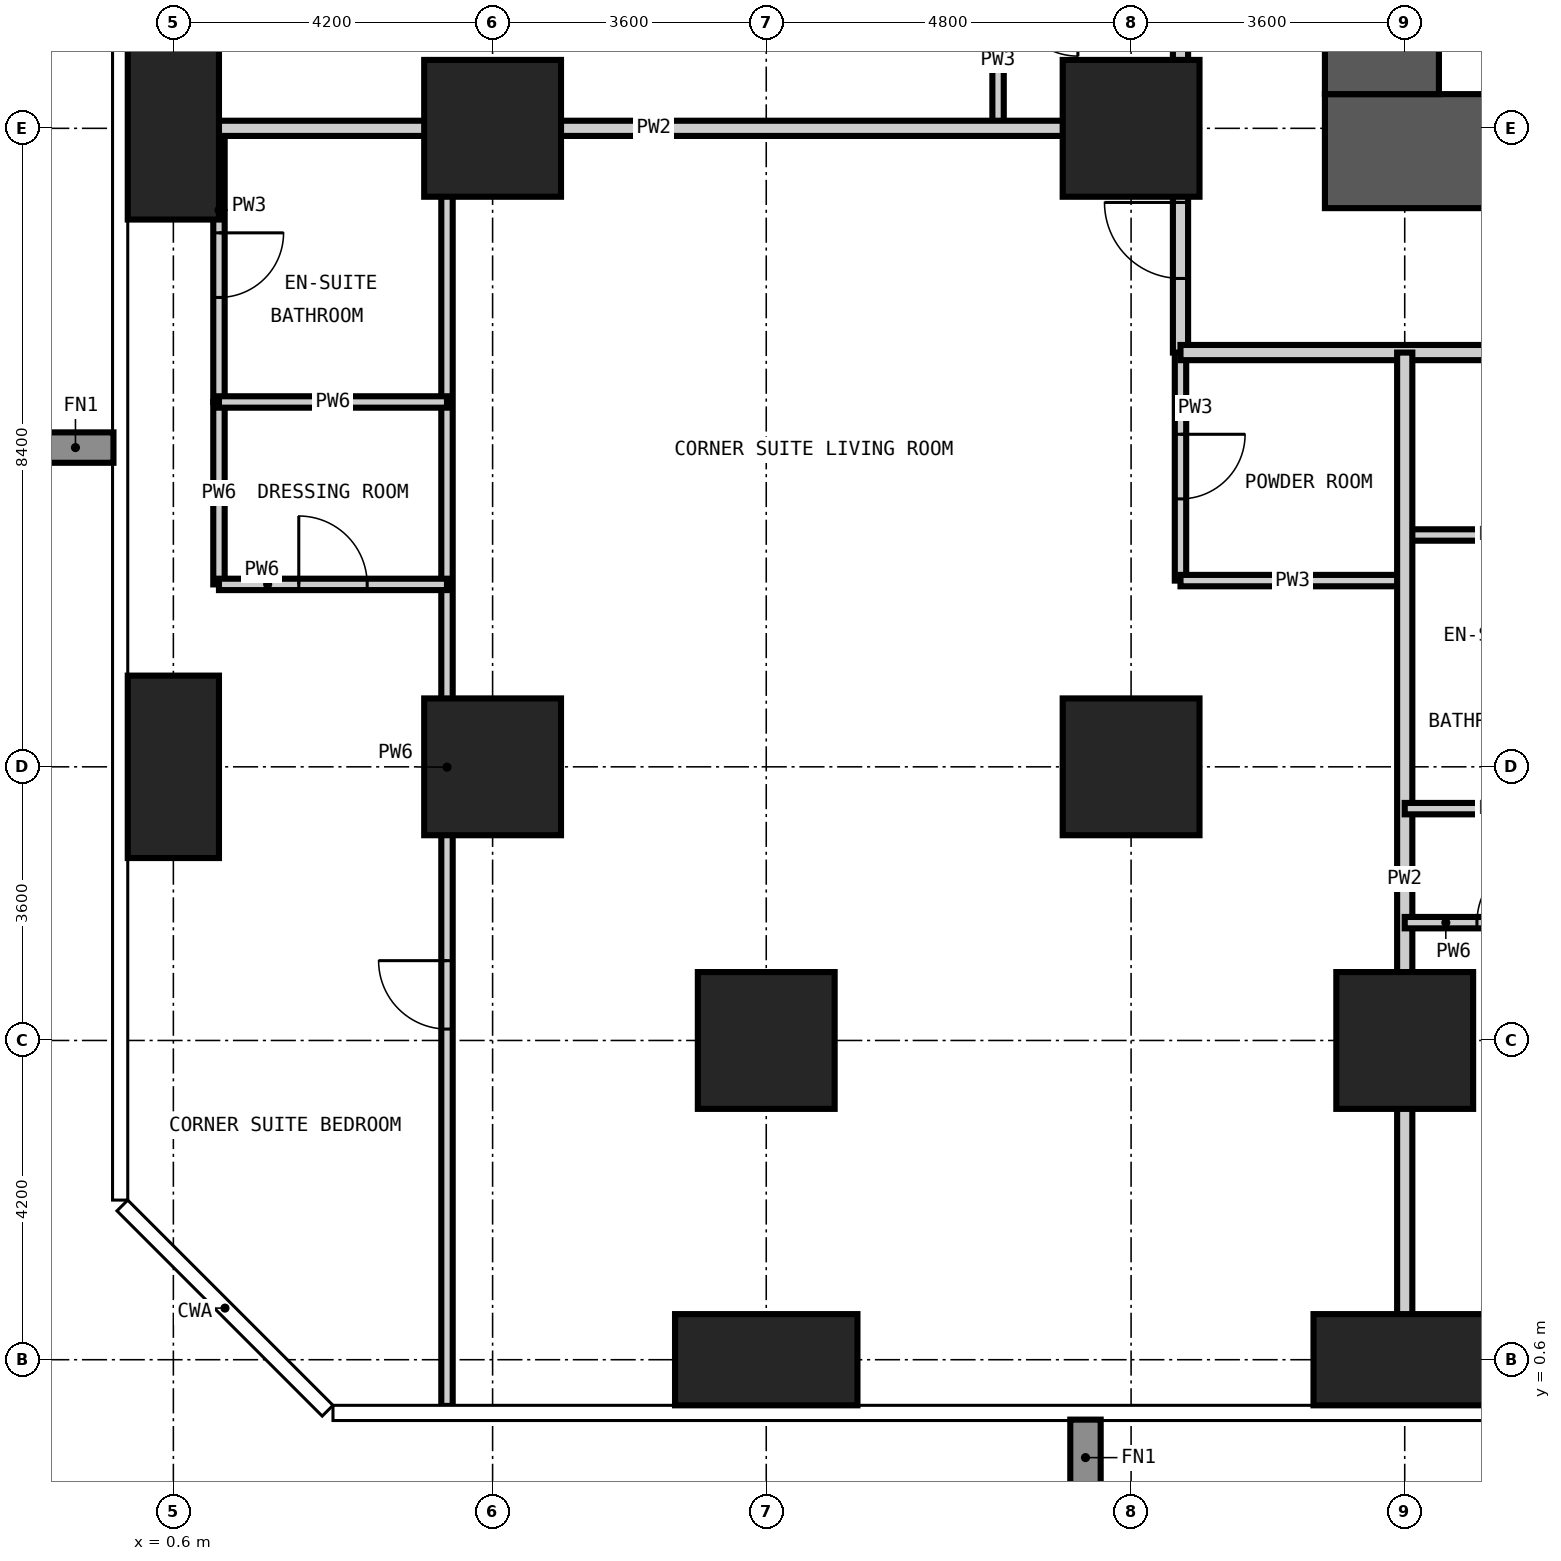
"""IFC4 building model, lengths in metres.
Left out: names, types, materials, properties, quantities, classifications, styles, units other than length and angle.
Written with IfcOpenShell. Run it as: python <this file> out.ifc"""

import sys

from ifc_helpers import new_model, si_unit, direction, frame, frame_2d, origin, origin_2d, place, context, subcontext, project, spatial, rectangle, extrude, element, fill, save


model = new_model("IFC4")
c1 = context("Model", 3, precision=1e-05, world=origin(), true_north=direction((0.0, 1.0)))
c2 = subcontext(c1, "Body", "Model", "MODEL_VIEW")
j1 = project(units=[si_unit("LENGTHUNIT", "METRE"), si_unit("PLANEANGLEUNIT", "RADIAN")], contexts=[c1])
p1 = place(None, origin())
s1 = spatial("IfcSite", under=j1, at=p1, CompositionType="ELEMENT")
p2 = place(p1, origin())
s2 = spatial("IfcBuilding", under=s1, at=p2, CompositionType="ELEMENT")
p3 = place(p2, frame((0.0, 0.0, 55.8)))
s3 = spatial("IfcBuildingStorey", under=s2, at=p3, CompositionType="ELEMENT", Elevation=55.8)
for number, where, z_axis, x_axis in (
    (1, (0.6, 8.4, -0.35), (0.0, 0.0, 1.0), (1.0, 0.0, 0.0)),
    (2, (0.6, 16.8, -0.35), (0.0, 0.0, 1.0), (1.0, 0.0, 0.0)),
):
    element("IfcColumn", number, at=place(p3, frame(where, z_axis=z_axis, x_axis=x_axis)), inside=s3, PredefinedType="COLUMN", context=c2, shape_type="SweptSolid", body=[
        extrude(rectangle(XDim=1.2, YDim=2.4, at=origin_2d()), origin(), (0.0, 0.0, 1.0), 3.6),
    ])
for number, where, z_axis, x_axis in (
    (3, (4.8, 8.4, -0.35), (0.0, 0.0, 1.0), (1.0, 0.0, 0.0)),
    (4, (4.8, 16.8, -0.35), (0.0, 0.0, 1.0), (1.0, 0.0, 0.0)),
):
    element("IfcColumn", number, at=place(p3, frame(where, z_axis=z_axis, x_axis=x_axis)), inside=s3, PredefinedType="COLUMN", context=c2, shape_type="SweptSolid", body=[
        extrude(rectangle(XDim=1.8, YDim=1.8, at=origin_2d()), origin(), (0.0, 0.0, 1.0), 3.6),
    ])
p4 = place(p3, frame((8.4, 0.6, -0.35), z_axis=(0.0, 0.0, 1.0), x_axis=(1.0, 0.0, 0.0)))
e5 = element("IfcColumn", 5, at=p4, inside=s3, PredefinedType="COLUMN", context=c2, shape_type="SweptSolid", body=[
    extrude(rectangle(XDim=2.4, YDim=1.2, at=origin_2d()), origin(), (0.0, 0.0, 1.0), 3.6),
])
for number, where, z_axis, x_axis in (
    (6, (8.4, 4.8, -0.35), (0.0, 0.0, 1.0), (1.0, 0.0, 0.0)),
    (7, (13.2, 8.4, -0.35), (0.0, 0.0, 1.0), (1.0, 0.0, 0.0)),
    (8, (13.2, 16.8, -0.35), (0.0, 0.0, 1.0), (1.0, 0.0, 0.0)),
):
    element("IfcColumn", number, at=place(p3, frame(where, z_axis=z_axis, x_axis=x_axis)), inside=s3, PredefinedType="COLUMN", context=c2, shape_type="SweptSolid", body=[
        extrude(rectangle(XDim=1.8, YDim=1.8, at=origin_2d()), origin(), (0.0, 0.0, 1.0), 3.6),
    ])
p5 = place(p3, frame((16.8, 0.6, -0.35), z_axis=(0.0, 0.0, 1.0), x_axis=(1.0, 0.0, 0.0)))
e9 = element("IfcColumn", 9, at=p5, inside=s3, PredefinedType="COLUMN", context=c2, shape_type="SweptSolid", body=[
    extrude(rectangle(XDim=2.4, YDim=1.2, at=origin_2d()), origin(), (0.0, 0.0, 1.0), 3.6),
])
p6 = place(p3, frame((16.8, 4.8, -0.35), z_axis=(0.0, 0.0, 1.0), x_axis=(1.0, 0.0, 0.0)))
e10 = element("IfcColumn", 10, at=p6, inside=s3, PredefinedType="COLUMN", context=c2, shape_type="SweptSolid", body=[
    extrude(rectangle(XDim=1.8, YDim=1.8, at=origin_2d()), origin(), (0.0, 0.0, 1.0), 3.6),
])
p7 = place(p3, frame((15.75, 16.5, -0.35), z_axis=(0.0, 0.0, 1.0), x_axis=(1.0, 0.0, 0.0)))
e11 = element("IfcWall", 11, at=p7, inside=s3, PredefinedType="SHEAR", context=c2, shape_type="SweptSolid", body=[
    extrude(rectangle(XDim=27.3, YDim=1.5, at=frame_2d((13.65, 0.0))), origin(), (0.0, 0.0, 1.0), 3.6),
])
p8 = place(p7, frame((13.15, 0.0, 0.35)))
e12 = element("IfcOpeningElement", 12, at=p8, cuts=e11, PredefinedType="OPENING", context=c2, shape_type="SweptSolid", body=[
    extrude(rectangle(XDim=1.0, YDim=2.1, at=frame_2d((0.5, 1.05))), frame((0.0, 0.76, 0.0), z_axis=(0.0, -1.0, 0.0), x_axis=(1.0, 0.0, 0.0)), (0.0, 0.0, 1.0), 1.52),
])
p9 = place(p7, frame((19.45, 0.0, 0.35)))
e13 = element("IfcOpeningElement", 13, at=p9, cuts=e11, PredefinedType="OPENING", context=c2, shape_type="SweptSolid", body=[
    extrude(rectangle(XDim=1.0, YDim=2.1, at=frame_2d((0.5, 1.05))), frame((0.0, 0.76, 0.0), z_axis=(0.0, -1.0, 0.0), x_axis=(1.0, 0.0, 0.0)), (0.0, 0.0, 1.0), 1.52),
])
p10 = place(p3, frame((16.5, 41.55, -0.35), z_axis=(0.0, 0.0, 1.0), x_axis=(0.0, -1.0, 0.0)))
e14 = element("IfcWall", 14, at=p10, inside=s3, PredefinedType="SHEAR", context=c2, shape_type="SweptSolid", body=[
    extrude(rectangle(XDim=24.3, YDim=1.5, at=frame_2d((12.15, 0.0))), origin(), (0.0, 0.0, 1.0), 3.6),
])
p11 = place(p10, frame((11.25, 0.0, 0.35)))
e15 = element("IfcOpeningElement", 15, at=p11, cuts=e14, PredefinedType="OPENING", context=c2, shape_type="SweptSolid", body=[
    extrude(rectangle(XDim=1.8, YDim=2.2, at=frame_2d((0.9, 1.1))), frame((0.0, 0.76, 0.0), z_axis=(0.0, -1.0, 0.0), x_axis=(1.0, 0.0, 0.0)), (0.0, 0.0, 1.0), 1.52),
])
p12 = place(p10, frame((20.05, 0.0, 0.35)))
e16 = element("IfcOpeningElement", 16, at=p12, cuts=e14, PredefinedType="OPENING", context=c2, shape_type="SweptSolid", body=[
    extrude(rectangle(XDim=1.0, YDim=2.1, at=frame_2d((0.5, 1.05))), frame((0.0, 0.76, 0.0), z_axis=(0.0, -1.0, 0.0), x_axis=(1.0, 0.0, 0.0)), (0.0, 0.0, 1.0), 1.52),
])
p13 = place(p10, frame((5.35, 0.0, 0.35)))
e17 = element("IfcOpeningElement", 17, at=p13, cuts=e14, PredefinedType="OPENING", context=c2, shape_type="SweptSolid", body=[
    extrude(rectangle(XDim=1.0, YDim=2.1, at=frame_2d((0.5, 1.05))), frame((0.0, 0.76, 0.0), z_axis=(0.0, -1.0, 0.0), x_axis=(1.0, 0.0, 0.0)), (0.0, 0.0, 1.0), 1.52),
])
p14 = place(p3, frame((1.2, 13.2, 0.0), z_axis=(0.0, 0.0, 1.0), x_axis=(0.0, 1.0, 0.0)))
e18 = element("IfcWall", 18, at=p14, inside=s3, PredefinedType="PARTITIONING", context=c2, shape_type="SweptSolid", body=[
    extrude(rectangle(XDim=3.6, YDim=0.15, at=frame_2d((1.8, 0.0))), origin(), (0.0, 0.0, 1.0), 3.25),
])
p15 = place(p14, frame((1.375, 0.0, 0.0)))
e19 = element("IfcOpeningElement", 19, at=p15, cuts=e18, PredefinedType="OPENING", context=c2, shape_type="SweptSolid", body=[
    extrude(rectangle(XDim=0.85, YDim=2.1, at=frame_2d((0.425, 1.05))), frame((0.0, 0.085, 0.0), z_axis=(0.0, -1.0, 0.0), x_axis=(1.0, 0.0, 0.0)), (0.0, 0.0, 1.0), 0.17),
])
p16 = place(p3, frame((11.45, 16.8, 0.0), z_axis=(0.0, 0.0, 1.0), x_axis=(0.0, 1.0, 0.0)))
e20 = element("IfcWall", 20, at=p16, inside=s3, PredefinedType="PARTITIONING", context=c2, shape_type="SweptSolid", body=[
    extrude(rectangle(XDim=1.8, YDim=0.15, at=frame_2d((0.9, 0.0))), origin(), (0.0, 0.0, 1.0), 3.25),
])
p17 = place(p3, frame((13.85, 10.85, 0.0), z_axis=(0.0, 0.0, 1.0), x_axis=(0.0, 1.0, 0.0)))
e21 = element("IfcWall", 21, at=p17, inside=s3, PredefinedType="PARTITIONING", context=c2, shape_type="SweptSolid", body=[
    extrude(rectangle(XDim=3.0, YDim=0.15, at=frame_2d((1.5, 0.0))), origin(), (0.0, 0.0, 1.0), 3.25),
])
p18 = place(p17, frame((1.075, 0.0, 0.0)))
e22 = element("IfcOpeningElement", 22, at=p18, cuts=e21, PredefinedType="OPENING", context=c2, shape_type="SweptSolid", body=[
    extrude(rectangle(XDim=0.85, YDim=2.1, at=frame_2d((0.425, 1.05))), frame((0.0, 0.085, 0.0), z_axis=(0.0, -1.0, 0.0), x_axis=(1.0, 0.0, 0.0)), (0.0, 0.0, 1.0), 0.17),
])
p19 = place(p3, frame((13.85, 10.85, 0.0), z_axis=(0.0, 0.0, 1.0), x_axis=(1.0, 0.0, 0.0)))
e23 = element("IfcWall", 23, at=p19, inside=s3, PredefinedType="PARTITIONING", context=c2, shape_type="SweptSolid", body=[
    extrude(rectangle(XDim=2.95, YDim=0.15, at=frame_2d((1.475, 0.0))), origin(), (0.0, 0.0, 1.0), 3.25),
])
p20 = place(p3, frame((16.8, 11.45, 0.0), z_axis=(0.0, 0.0, 1.0), x_axis=(1.0, 0.0, 0.0)))
e24 = element("IfcWall", 24, at=p20, inside=s3, PredefinedType="PARTITIONING", context=c2, shape_type="SweptSolid", body=[
    extrude(rectangle(XDim=2.4, YDim=0.15, at=frame_2d((1.2, 0.0))), origin(), (0.0, 0.0, 1.0), 3.25),
])
p21 = place(p3, frame((13.85, 13.85, 0.0), z_axis=(0.0, 0.0, 1.0), x_axis=(0.0, 1.0, 0.0)))
e25 = element("IfcWall", 25, at=p21, inside=s3, PredefinedType="PARTITIONING", context=c2, shape_type="SweptSolid", body=[
    extrude(rectangle(XDim=32.3, YDim=0.2, at=frame_2d((16.15, 0.0))), origin(), (0.0, 0.0, 1.0), 3.25),
])
p22 = place(p21, frame((5.45, 0.0, 0.0)))
e26 = element("IfcOpeningElement", 26, at=p22, cuts=e25, PredefinedType="OPENING", context=c2, shape_type="SweptSolid", body=[
    extrude(rectangle(XDim=1.0, YDim=2.2, at=frame_2d((0.5, 1.1))), frame((0.0, 0.11, 0.0), z_axis=(0.0, -1.0, 0.0), x_axis=(1.0, 0.0, 0.0)), (0.0, 0.0, 1.0), 0.22),
])
p23 = place(p21, frame((13.85, 0.0, 0.0)))
e27 = element("IfcOpeningElement", 27, at=p23, cuts=e25, PredefinedType="OPENING", context=c2, shape_type="SweptSolid", body=[
    extrude(rectangle(XDim=1.0, YDim=2.2, at=frame_2d((0.5, 1.1))), frame((0.0, 0.11, 0.0), z_axis=(0.0, -1.0, 0.0), x_axis=(1.0, 0.0, 0.0)), (0.0, 0.0, 1.0), 0.22),
])
p24 = place(p21, frame((22.25, 0.0, 0.0)))
e28 = element("IfcOpeningElement", 28, at=p24, cuts=e25, PredefinedType="OPENING", context=c2, shape_type="SweptSolid", body=[
    extrude(rectangle(XDim=1.0, YDim=2.2, at=frame_2d((0.5, 1.1))), frame((0.0, 0.11, 0.0), z_axis=(0.0, -1.0, 0.0), x_axis=(1.0, 0.0, 0.0)), (0.0, 0.0, 1.0), 0.22),
])
p25 = place(p21, frame((0.975, 0.0, 0.0)))
e29 = element("IfcOpeningElement", 29, at=p25, cuts=e25, PredefinedType="OPENING", context=c2, shape_type="SweptSolid", body=[
    extrude(rectangle(XDim=1.0, YDim=2.2, at=frame_2d((0.5, 1.1))), frame((0.0, 0.11, 0.0), z_axis=(0.0, -1.0, 0.0), x_axis=(1.0, 0.0, 0.0)), (0.0, 0.0, 1.0), 0.22),
])
p26 = place(p21, frame((29.725, 0.0, 0.0)))
e30 = element("IfcOpeningElement", 30, at=p26, cuts=e25, PredefinedType="OPENING", context=c2, shape_type="SweptSolid", body=[
    extrude(rectangle(XDim=1.0, YDim=2.2, at=frame_2d((0.5, 1.1))), frame((0.0, 0.11, 0.0), z_axis=(0.0, -1.0, 0.0), x_axis=(1.0, 0.0, 0.0)), (0.0, 0.0, 1.0), 0.22),
])
p27 = place(p3, frame((45.55, 13.85, 0.0), z_axis=(0.0, 0.0, 1.0), x_axis=(-1.0, 0.0, 0.0)))
e31 = element("IfcWall", 31, at=p27, inside=s3, PredefinedType="PARTITIONING", context=c2, shape_type="SweptSolid", body=[
    extrude(rectangle(XDim=31.7, YDim=0.2, at=frame_2d((15.85, 0.0))), origin(), (0.0, 0.0, 1.0), 3.25),
])
p28 = place(p27, frame((24.05, 0.0, 0.0)))
e32 = element("IfcOpeningElement", 32, at=p28, cuts=e31, PredefinedType="OPENING", context=c2, shape_type="SweptSolid", body=[
    extrude(rectangle(XDim=1.0, YDim=2.2, at=frame_2d((0.5, 1.1))), frame((0.0, 0.11, 0.0), z_axis=(0.0, -1.0, 0.0), x_axis=(1.0, 0.0, 0.0)), (0.0, 0.0, 1.0), 0.22),
])
p29 = place(p27, frame((15.65, 0.0, 0.0)))
e33 = element("IfcOpeningElement", 33, at=p29, cuts=e31, PredefinedType="OPENING", context=c2, shape_type="SweptSolid", body=[
    extrude(rectangle(XDim=1.0, YDim=2.2, at=frame_2d((0.5, 1.1))), frame((0.0, 0.11, 0.0), z_axis=(0.0, -1.0, 0.0), x_axis=(1.0, 0.0, 0.0)), (0.0, 0.0, 1.0), 0.22),
])
p30 = place(p27, frame((7.25, 0.0, 0.0)))
e34 = element("IfcOpeningElement", 34, at=p30, cuts=e31, PredefinedType="OPENING", context=c2, shape_type="SweptSolid", body=[
    extrude(rectangle(XDim=1.0, YDim=2.2, at=frame_2d((0.5, 1.1))), frame((0.0, 0.11, 0.0), z_axis=(0.0, -1.0, 0.0), x_axis=(1.0, 0.0, 0.0)), (0.0, 0.0, 1.0), 0.22),
])
for number, where, z_axis, x_axis in (
    (35, (16.8, -0.008, 0.0), (0.0, 0.0, 1.0), (0.0, 1.0, 0.0)),
    (36, (-0.008, 16.8, 0.0), (0.0, 0.0, 1.0), (1.0, 0.0, 0.0)),
):
    element("IfcWall", number, at=place(p3, frame(where, z_axis=z_axis, x_axis=x_axis)), inside=s3, PredefinedType="PARTITIONING", context=c2, shape_type="SweptSolid", body=[
        extrude(rectangle(XDim=13.858, YDim=0.2, at=frame_2d((6.929, 0.0))), origin(), (0.0, 0.0, 1.0), 3.25),
    ])
p31 = place(p3, frame((1.2, 10.8, 0.0), z_axis=(0.0, 0.0, 1.0), x_axis=(0.0, 1.0, 0.0)))
e37 = element("IfcWall", 37, at=p31, inside=s3, PredefinedType="PARTITIONING", context=c2, shape_type="SweptSolid", body=[
    extrude(rectangle(XDim=2.4, YDim=0.15, at=frame_2d((1.2, 0.0))), origin(), (0.0, 0.0, 1.0), 3.25),
])
p32 = place(p3, frame((4.2, -0.008, 0.0), z_axis=(0.0, 0.0, 1.0), x_axis=(0.0, 1.0, 0.0)))
e38 = element("IfcWall", 38, at=p32, inside=s3, PredefinedType="PARTITIONING", context=c2, shape_type="SweptSolid", body=[
    extrude(rectangle(XDim=16.808, YDim=0.15, at=frame_2d((8.404, 0.0))), origin(), (0.0, 0.0, 1.0), 3.25),
])
p33 = place(p32, frame((4.958, 0.0, 0.0)))
e39 = element("IfcOpeningElement", 39, at=p33, cuts=e38, PredefinedType="OPENING", context=c2, shape_type="SweptSolid", body=[
    extrude(rectangle(XDim=0.9, YDim=2.1, at=frame_2d((0.45, 1.05))), frame((0.0, 0.085, 0.0), z_axis=(0.0, -1.0, 0.0), x_axis=(1.0, 0.0, 0.0)), (0.0, 0.0, 1.0), 0.17),
])
p34 = place(p3, frame((16.8, 6.35, 0.0), z_axis=(0.0, 0.0, 1.0), x_axis=(1.0, 0.0, 0.0)))
e40 = element("IfcWall", 40, at=p34, inside=s3, PredefinedType="PARTITIONING", context=c2, shape_type="SweptSolid", body=[
    extrude(rectangle(XDim=2.4, YDim=0.15, at=frame_2d((1.2, 0.0))), origin(), (0.0, 0.0, 1.0), 3.25),
])
p35 = place(p34, frame((0.95, 0.0, 0.0)))
e41 = element("IfcOpeningElement", 41, at=p35, cuts=e40, PredefinedType="OPENING", context=c2, shape_type="SweptSolid", body=[
    extrude(rectangle(XDim=0.9, YDim=2.1, at=frame_2d((0.45, 1.05))), frame((0.0, 0.085, 0.0), z_axis=(0.0, -1.0, 0.0), x_axis=(1.0, 0.0, 0.0)), (0.0, 0.0, 1.0), 0.17),
])
p36 = place(p3, frame((16.8, 7.85, 0.0), z_axis=(0.0, 0.0, 1.0), x_axis=(1.0, 0.0, 0.0)))
e42 = element("IfcWall", 42, at=p36, inside=s3, PredefinedType="PARTITIONING", context=c2, shape_type="SweptSolid", body=[
    extrude(rectangle(XDim=2.4, YDim=0.15, at=frame_2d((1.2, 0.0))), origin(), (0.0, 0.0, 1.0), 3.25),
])
p37 = place(p3, frame((1.2, 10.8, 0.0), z_axis=(0.0, 0.0, 1.0), x_axis=(1.0, 0.0, 0.0)))
e43 = element("IfcWall", 43, at=p37, inside=s3, PredefinedType="PARTITIONING", context=c2, shape_type="SweptSolid", body=[
    extrude(rectangle(XDim=3.0, YDim=0.15, at=frame_2d((1.5, 0.0))), origin(), (0.0, 0.0, 1.0), 3.25),
])
p38 = place(p37, frame((1.05, 0.0, 0.0)))
e44 = element("IfcOpeningElement", 44, at=p38, cuts=e43, PredefinedType="OPENING", context=c2, shape_type="SweptSolid", body=[
    extrude(rectangle(XDim=0.9, YDim=2.1, at=frame_2d((0.45, 1.05))), frame((0.0, 0.085, 0.0), z_axis=(0.0, -1.0, 0.0), x_axis=(1.0, 0.0, 0.0)), (0.0, 0.0, 1.0), 0.17),
])
p39 = place(p3, frame((1.2, 13.2, 0.0), z_axis=(0.0, 0.0, 1.0), x_axis=(1.0, 0.0, 0.0)))
e45 = element("IfcWall", 45, at=p39, inside=s3, PredefinedType="PARTITIONING", context=c2, shape_type="SweptSolid", body=[
    extrude(rectangle(XDim=3.0, YDim=0.15, at=frame_2d((1.5, 0.0))), origin(), (0.0, 0.0, 1.0), 3.25),
])
p40 = place(p35, origin())
e46 = element("IfcDoor", 46, at=p40, inside=s3, OperationType="SINGLE_SWING_RIGHT", PredefinedType="DOOR", context=c2, shape_type="SweptSolid", body=[
    extrude(rectangle(XDim=0.9, YDim=2.1, at=frame_2d((0.45, 1.05))), frame((0.0, 0.025, 0.0), z_axis=(0.0, -1.0, 0.0), x_axis=(1.0, 0.0, 0.0)), (0.0, 0.0, 1.0), 0.05),
])
fill(e41, e46)
p41 = place(p25, origin())
e47 = element("IfcDoor", 47, at=p41, inside=s3, OperationType="SINGLE_SWING_RIGHT", PredefinedType="DOOR", context=c2, shape_type="SweptSolid", body=[
    extrude(rectangle(XDim=1.0, YDim=2.2, at=frame_2d((0.5, 1.1))), frame((0.0, 0.025, 0.0), z_axis=(0.0, -1.0, 0.0), x_axis=(1.0, 0.0, 0.0)), (0.0, 0.0, 1.0), 0.05),
])
fill(e29, e47)
p42 = place(p18, frame((0.85, 0.0, 0.0), z_axis=(0.0, 0.0, 1.0), x_axis=(-1.0, 0.0, 0.0)))
e48 = element("IfcDoor", 48, at=p42, inside=s3, OperationType="SINGLE_SWING_LEFT", PredefinedType="DOOR", context=c2, shape_type="SweptSolid", body=[
    extrude(rectangle(XDim=0.85, YDim=2.1, at=frame_2d((0.425, 1.05))), frame((0.0, 0.025, 0.0), z_axis=(0.0, -1.0, 0.0), x_axis=(1.0, 0.0, 0.0)), (0.0, 0.0, 1.0), 0.05),
])
fill(e22, e48)
p43 = place(p33, origin())
e49 = element("IfcDoor", 49, at=p43, inside=s3, OperationType="SINGLE_SWING_RIGHT", PredefinedType="DOOR", context=c2, shape_type="SweptSolid", body=[
    extrude(rectangle(XDim=0.9, YDim=2.1, at=frame_2d((0.45, 1.05))), frame((0.0, 0.025, 0.0), z_axis=(0.0, -1.0, 0.0), x_axis=(1.0, 0.0, 0.0)), (0.0, 0.0, 1.0), 0.05),
])
fill(e39, e49)
p44 = place(p15, frame((0.85, 0.0, 0.0), z_axis=(0.0, 0.0, 1.0), x_axis=(-1.0, 0.0, 0.0)))
e50 = element("IfcDoor", 50, at=p44, inside=s3, OperationType="SINGLE_SWING_LEFT", PredefinedType="DOOR", context=c2, shape_type="SweptSolid", body=[
    extrude(rectangle(XDim=0.85, YDim=2.1, at=frame_2d((0.425, 1.05))), frame((0.0, 0.025, 0.0), z_axis=(0.0, -1.0, 0.0), x_axis=(1.0, 0.0, 0.0)), (0.0, 0.0, 1.0), 0.05),
])
fill(e19, e50)
p45 = place(p38, origin())
e51 = element("IfcDoor", 51, at=p45, inside=s3, OperationType="SINGLE_SWING_LEFT", PredefinedType="DOOR", context=c2, shape_type="SweptSolid", body=[
    extrude(rectangle(XDim=0.9, YDim=2.1, at=frame_2d((0.45, 1.05))), frame((0.0, 0.025, 0.0), z_axis=(0.0, -1.0, 0.0), x_axis=(1.0, 0.0, 0.0)), (0.0, 0.0, 1.0), 0.05),
])
fill(e44, e51)
save(model, sys.argv[1])
